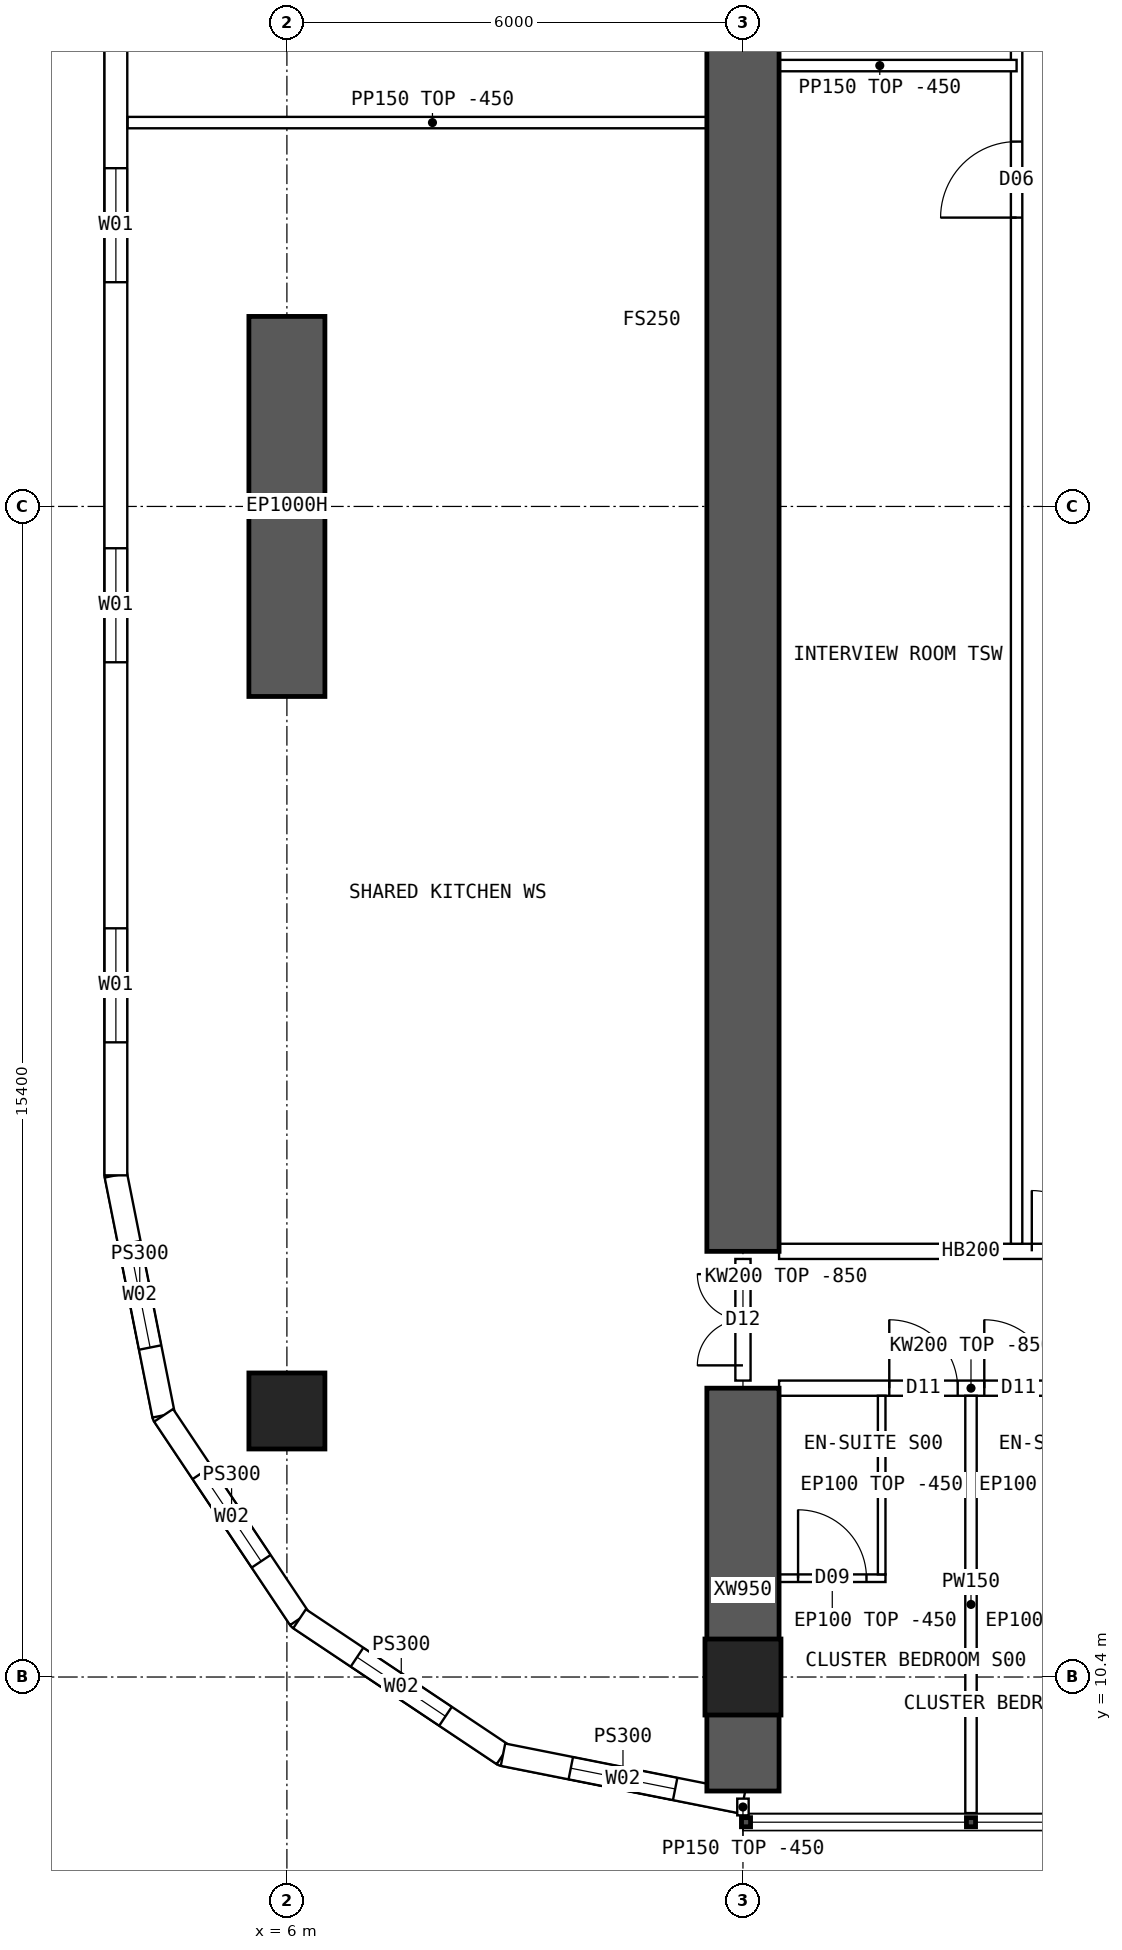
"""IFC4 building model, lengths in metres.
Left out: names, types, materials, properties, quantities, classifications, styles, units other than length and angle.
Written with IfcOpenShell. Run it as: python <this file> out.ifc"""

import sys

from ifc_helpers import new_model, si_unit, direction, frame, frame_2d, origin, origin_2d, place, context, subcontext, project, spatial, polyline, rectangle, hollow_rectangle, outline, extrude, element, fill, save


model = new_model("IFC4")
c1 = context("Model", 3, precision=1e-05, world=origin(), true_north=direction((0.0, 1.0)))
c2 = subcontext(c1, "Body", "Model", "MODEL_VIEW")
j1 = project(units=[si_unit("LENGTHUNIT", "METRE"), si_unit("PLANEANGLEUNIT", "RADIAN")], contexts=[c1])
p1 = place(None, origin())
s1 = spatial("IfcSite", under=j1, at=p1, CompositionType="ELEMENT")
p2 = place(p1, origin())
s2 = spatial("IfcBuilding", under=s1, at=p2, CompositionType="ELEMENT")
p3 = place(p2, frame((0.0, 0.0, 80.65)))
s3 = spatial("IfcBuildingStorey", under=s2, at=p3, CompositionType="ELEMENT", Elevation=80.65)
for number, where, z_axis, x_axis in (
    (1, (12.0, 10.4, 0.0), (0.0, 0.0, 1.0), (1.0, 0.0, 0.0)),
    (2, (6.0, 13.9, 0.0), (0.0, 0.0, 1.0), (1.0, 0.0, 0.0)),
):
    element("IfcColumn", number, at=place(p3, frame(where, z_axis=z_axis, x_axis=x_axis)), inside=s3, PredefinedType="COLUMN", context=c2, shape_type="SweptSolid", body=[
        extrude(hollow_rectangle(XDim=1.0, YDim=1.0, WallThickness=0.1, at=origin_2d()), origin(), (0.0, 0.0, 1.0), 3.75),
    ])
p4 = place(p3, frame((6.0, 23.3, 0.0), z_axis=(0.0, 0.0, 1.0), x_axis=(0.0, 1.0, 0.0)))
e3 = element("IfcWall", 3, at=p4, inside=s3, PredefinedType="SHEAR", context=c2, shape_type="SweptSolid", body=[
    extrude(rectangle(XDim=5.0, YDim=1.0, at=frame_2d((2.5, 0.0))), origin(), (0.0, 0.0, 1.0), 3.75),
])
p5 = place(p3, frame((12.0, 8.9, 0.0), z_axis=(0.0, 0.0, 1.0), x_axis=(0.0, 1.0, 0.0)))
e4 = element("IfcWall", 4, at=p5, inside=s3, PredefinedType="SHEAR", context=c2, shape_type="SweptSolid", body=[
    extrude(rectangle(XDim=5.3, YDim=0.95, at=frame_2d((2.65, 0.0))), origin(), (0.0, 0.0, 1.0), 3.75),
])
p6 = place(p3, frame((12.0, 16.0, 0.0), z_axis=(0.0, 0.0, 1.0), x_axis=(0.0, 1.0, 0.0)))
e5 = element("IfcWall", 5, at=p6, inside=s3, PredefinedType="SHEAR", context=c2, shape_type="SweptSolid", body=[
    extrude(rectangle(XDim=32.0, YDim=0.95, at=frame_2d((16.0, 0.0))), origin(), (0.0, 0.0, 1.0), 3.75),
])
p7 = place(p3, frame((3.75, 47.0, 0.0), z_axis=(0.0, 0.0, 1.0), x_axis=(0.0, -1.0, 0.0)))
e6 = element("IfcWall", 6, at=p7, inside=s3, PredefinedType="SOLIDWALL", context=c2, shape_type="SweptSolid", body=[
    extrude(outline(polyline([(-0.015, -0.15), (30.015, -0.15), (29.985, 0.15), (0.015, 0.15), (-0.015, -0.15)])), origin(), (0.0, 0.0, 1.0), 3.3),
])
p8 = place(p7, frame((1.75, 0.0, 0.9)))
e7 = element("IfcOpeningElement", 7, at=p8, cuts=e6, PredefinedType="OPENING", context=c2, shape_type="SweptSolid", body=[
    extrude(rectangle(XDim=1.5, YDim=2.0, at=frame_2d((0.75, 1.0))), frame((0.0, 0.16, 0.0), z_axis=(0.0, -1.0, 0.0), x_axis=(1.0, 0.0, 0.0)), (0.0, 0.0, 1.0), 0.32),
])
p9 = place(p7, frame((6.75, 0.0, 0.9)))
e8 = element("IfcOpeningElement", 8, at=p9, cuts=e6, PredefinedType="OPENING", context=c2, shape_type="SweptSolid", body=[
    extrude(rectangle(XDim=1.5, YDim=2.0, at=frame_2d((0.75, 1.0))), frame((0.0, 0.16, 0.0), z_axis=(0.0, -1.0, 0.0), x_axis=(1.0, 0.0, 0.0)), (0.0, 0.0, 1.0), 0.32),
])
p10 = place(p7, frame((11.75, 0.0, 0.9)))
e9 = element("IfcOpeningElement", 9, at=p10, cuts=e6, PredefinedType="OPENING", context=c2, shape_type="SweptSolid", body=[
    extrude(rectangle(XDim=1.5, YDim=2.0, at=frame_2d((0.75, 1.0))), frame((0.0, 0.16, 0.0), z_axis=(0.0, -1.0, 0.0), x_axis=(1.0, 0.0, 0.0)), (0.0, 0.0, 1.0), 0.32),
])
p11 = place(p7, frame((16.75, 0.0, 0.9)))
e10 = element("IfcOpeningElement", 10, at=p11, cuts=e6, PredefinedType="OPENING", context=c2, shape_type="SweptSolid", body=[
    extrude(rectangle(XDim=1.5, YDim=2.0, at=frame_2d((0.75, 1.0))), frame((0.0, 0.16, 0.0), z_axis=(0.0, -1.0, 0.0), x_axis=(1.0, 0.0, 0.0)), (0.0, 0.0, 1.0), 0.32),
])
p12 = place(p7, frame((21.75, 0.0, 0.9)))
e11 = element("IfcOpeningElement", 11, at=p12, cuts=e6, PredefinedType="OPENING", context=c2, shape_type="SweptSolid", body=[
    extrude(rectangle(XDim=1.5, YDim=2.0, at=frame_2d((0.75, 1.0))), frame((0.0, 0.16, 0.0), z_axis=(0.0, -1.0, 0.0), x_axis=(1.0, 0.0, 0.0)), (0.0, 0.0, 1.0), 0.32),
])
p13 = place(p7, frame((26.75, 0.0, 0.9)))
e12 = element("IfcOpeningElement", 12, at=p13, cuts=e6, PredefinedType="OPENING", context=c2, shape_type="SweptSolid", body=[
    extrude(rectangle(XDim=1.5, YDim=2.0, at=frame_2d((0.75, 1.0))), frame((0.0, 0.16, 0.0), z_axis=(0.0, -1.0, 0.0), x_axis=(1.0, 0.0, 0.0)), (0.0, 0.0, 1.0), 0.32),
])
p14 = place(p3, frame((3.75, 17.0, 0.0), z_axis=(0.0, 0.0, 1.0), x_axis=(0.195080412259, -0.980787251524, 0.0)))
e13 = element("IfcWall", 13, at=p14, inside=s3, PredefinedType="SOLIDWALL", context=c2, shape_type="SweptSolid", body=[
    extrude(outline(polyline([(-0.015, -0.15), (3.249, -0.15), (3.189, 0.15), (0.015, 0.15), (-0.015, -0.15)])), origin(), (0.0, 0.0, 1.0), 3.3),
])
p15 = place(p14, frame((0.909, 0.0, 0.9)))
e14 = element("IfcOpeningElement", 14, at=p15, cuts=e13, PredefinedType="OPENING", context=c2, shape_type="SweptSolid", body=[
    extrude(rectangle(XDim=1.4, YDim=1.8, at=frame_2d((0.7, 0.9))), frame((0.0, 0.16, 0.0), z_axis=(0.0, -1.0, 0.0), x_axis=(1.0, 0.0, 0.0)), (0.0, 0.0, 1.0), 0.32),
])
p16 = place(p3, frame((4.378, 13.843, 0.0), z_axis=(0.0, 0.0, 1.0), x_axis=(0.555609954424, -0.831443069936, 0.0)))
e15 = element("IfcWall", 15, at=p16, inside=s3, PredefinedType="SOLIDWALL", context=c2, shape_type="SweptSolid", body=[
    extrude(outline(polyline([(-0.03, -0.15), (3.249, -0.15), (3.189, 0.15), (0.03, 0.15), (-0.03, -0.15)])), origin(), (0.0, 0.0, 1.0), 3.3),
])
p17 = place(p16, frame((0.909, 0.0, 0.9)))
e16 = element("IfcOpeningElement", 16, at=p17, cuts=e15, PredefinedType="OPENING", context=c2, shape_type="SweptSolid", body=[
    extrude(rectangle(XDim=1.4, YDim=1.8, at=frame_2d((0.7, 0.9))), frame((0.0, 0.16, 0.0), z_axis=(0.0, -1.0, 0.0), x_axis=(1.0, 0.0, 0.0)), (0.0, 0.0, 1.0), 0.32),
])
p18 = place(p3, frame((6.167, 11.167, 0.0), z_axis=(0.0, 0.0, 1.0), x_axis=(0.831443069936, -0.555609954424, 0.0)))
e17 = element("IfcWall", 17, at=p18, inside=s3, PredefinedType="SOLIDWALL", context=c2, shape_type="SweptSolid", body=[
    extrude(outline(polyline([(-0.03, -0.15), (3.249, -0.15), (3.189, 0.15), (0.03, 0.15), (-0.03, -0.15)])), origin(), (0.0, 0.0, 1.0), 3.3),
])
p19 = place(p18, frame((0.909, 0.0, 0.9)))
e18 = element("IfcOpeningElement", 18, at=p19, cuts=e17, PredefinedType="OPENING", context=c2, shape_type="SweptSolid", body=[
    extrude(rectangle(XDim=1.4, YDim=1.8, at=frame_2d((0.7, 0.9))), frame((0.0, 0.16, 0.0), z_axis=(0.0, -1.0, 0.0), x_axis=(1.0, 0.0, 0.0)), (0.0, 0.0, 1.0), 0.32),
])
p20 = place(p3, frame((8.843, 9.378, 0.0), z_axis=(0.0, 0.0, 1.0), x_axis=(0.980787251524, -0.195080412259, 0.0)))
e19 = element("IfcWall", 19, at=p20, inside=s3, PredefinedType="SOLIDWALL", context=c2, shape_type="SweptSolid", body=[
    extrude(outline(polyline([(-0.03, -0.15), (3.249, -0.15), (3.189, 0.15), (0.03, 0.15), (-0.03, -0.15)])), origin(), (0.0, 0.0, 1.0), 3.3),
])
p21 = place(p20, frame((0.909, 0.0, 0.9)))
e20 = element("IfcOpeningElement", 20, at=p21, cuts=e19, PredefinedType="OPENING", context=c2, shape_type="SweptSolid", body=[
    extrude(rectangle(XDim=1.4, YDim=1.8, at=frame_2d((0.7, 0.9))), frame((0.0, 0.16, 0.0), z_axis=(0.0, -1.0, 0.0), x_axis=(1.0, 0.0, 0.0)), (0.0, 0.0, 1.0), 0.32),
])
p22 = place(p3, frame((12.475, 14.2, 0.0), z_axis=(0.0, 0.0, 1.0), x_axis=(1.0, 0.0, 0.0)))
e21 = element("IfcWall", 21, at=p22, inside=s3, PredefinedType="SOLIDWALL", context=c2, shape_type="SweptSolid", body=[
    extrude(outline(polyline([(0.0, 0.0), (5.05, 0.0), (5.05, 2.9), (0.0, 2.9), (0.0, 0.0)])), frame((0.0, 0.1, 0.0), z_axis=(0.0, -1.0, 0.0), x_axis=(1.0, 0.0, 0.0)), (0.0, 0.0, 1.0), 0.2),
])
p23 = place(p22, frame((1.45, 0.0, 0.0)))
e22 = element("IfcOpeningElement", 22, at=p23, cuts=e21, PredefinedType="OPENING", context=c2, shape_type="SweptSolid", body=[
    extrude(rectangle(XDim=0.9, YDim=2.1, at=frame_2d((0.45, 1.05))), frame((0.0, 0.11, 0.0), z_axis=(0.0, -1.0, 0.0), x_axis=(1.0, 0.0, 0.0)), (0.0, 0.0, 1.0), 0.22),
])
p24 = place(p22, frame((2.7, 0.0, 0.0)))
e23 = element("IfcOpeningElement", 23, at=p24, cuts=e21, PredefinedType="OPENING", context=c2, shape_type="SweptSolid", body=[
    extrude(rectangle(XDim=0.9, YDim=2.1, at=frame_2d((0.45, 1.05))), frame((0.0, 0.11, 0.0), z_axis=(0.0, -1.0, 0.0), x_axis=(1.0, 0.0, 0.0)), (0.0, 0.0, 1.0), 0.22),
])
p25 = place(p3, frame((12.475, 16.0, 0.0), z_axis=(0.0, 0.0, 1.0), x_axis=(1.0, 0.0, 0.0)))
e24 = element("IfcWall", 24, at=p25, inside=s3, PredefinedType="SOLIDWALL", context=c2, shape_type="SweptSolid", body=[
    extrude(rectangle(XDim=5.05, YDim=0.2, at=frame_2d((2.525, 0.0))), origin(), (0.0, 0.0, 1.0), 3.3),
])
p26 = place(p25, frame((3.325, 0.0, 0.0)))
e25 = element("IfcOpeningElement", 25, at=p26, cuts=e24, PredefinedType="OPENING", context=c2, shape_type="SweptSolid", body=[
    extrude(rectangle(XDim=1.6, YDim=2.1, at=frame_2d((0.8, 1.05))), frame((0.0, 0.11, 0.0), z_axis=(0.0, -1.0, 0.0), x_axis=(1.0, 0.0, 0.0)), (0.0, 0.0, 1.0), 0.22),
])
p27 = place(p3, frame((15.0, 8.61, 0.0), z_axis=(0.0, 0.0, 1.0), x_axis=(0.0, 1.0, 0.0)))
e26 = element("IfcWall", 26, at=p27, inside=s3, PredefinedType="PARTITIONING", context=c2, shape_type="SweptSolid", body=[
    extrude(outline(polyline([(0.0, 0.0), (5.49, 0.0), (5.49, 2.9), (5.442, 2.9), (5.44, 3.3), (1.992, 3.3), (1.99, 2.9), (1.592, 2.9), (1.59, 3.3), (0.0, 3.3), (0.0, 0.0)])), frame((0.0, 0.075, 0.0), z_axis=(0.0, -1.0, 0.0), x_axis=(1.0, 0.0, 0.0)), (0.0, 0.0, 1.0), 0.15),
])
p28 = place(p3, frame((13.875, 11.7, 0.0), z_axis=(0.0, 0.0, 1.0), x_axis=(-1.0, 0.0, 0.0)))
e27 = element("IfcWall", 27, at=p28, inside=s3, PredefinedType="PARTITIONING", context=c2, shape_type="SweptSolid", body=[
    extrude(rectangle(XDim=1.4, YDim=0.1, at=frame_2d((0.7, 0.0))), origin(), (0.0, 0.0, 1.0), 3.3),
])
p29 = place(p28, frame((0.25, 0.0, 0.0)))
e28 = element("IfcOpeningElement", 28, at=p29, cuts=e27, PredefinedType="OPENING", context=c2, shape_type="SweptSolid", body=[
    extrude(rectangle(XDim=0.9, YDim=2.1, at=frame_2d((0.45, 1.05))), frame((0.0, 0.06, 0.0), z_axis=(0.0, -1.0, 0.0), x_axis=(1.0, 0.0, 0.0)), (0.0, 0.0, 1.0), 0.12),
])
p30 = place(p3, frame((13.825, 11.75, 0.0), z_axis=(0.0, 0.0, 1.0), x_axis=(0.0, 1.0, 0.0)))
e29 = element("IfcWall", 29, at=p30, inside=s3, PredefinedType="PARTITIONING", context=c2, shape_type="SweptSolid", body=[
    extrude(outline(polyline([(0.0, 0.0), (2.35, 0.0), (2.35, 2.9), (2.302, 2.9), (2.3, 3.3), (0.0, 3.3), (0.0, 0.0)])), frame((0.0, 0.05, 0.0), z_axis=(0.0, -1.0, 0.0), x_axis=(1.0, 0.0, 0.0)), (0.0, 0.0, 1.0), 0.1),
])
p31 = place(p3, frame((15.6, 16.1, 0.0), z_axis=(0.0, 0.0, 1.0), x_axis=(0.0, 1.0, 0.0)))
e30 = element("IfcWall", 30, at=p31, inside=s3, PredefinedType="PARTITIONING", context=c2, shape_type="SweptSolid", body=[
    extrude(rectangle(XDim=31.8, YDim=0.15, at=frame_2d((15.9, 0.0))), origin(), (0.0, 0.0, 1.0), 3.3),
])
p32 = place(p31, frame((13.5, 0.0, 0.0)))
e31 = element("IfcOpeningElement", 31, at=p32, cuts=e30, PredefinedType="OPENING", context=c2, shape_type="SweptSolid", body=[
    extrude(rectangle(XDim=1.0, YDim=2.1, at=frame_2d((0.5, 1.05))), frame((0.0, 0.085, 0.0), z_axis=(0.0, -1.0, 0.0), x_axis=(1.0, 0.0, 0.0)), (0.0, 0.0, 1.0), 0.17),
])
p33 = place(p31, frame((16.5, 0.0, 0.0)))
e32 = element("IfcOpeningElement", 32, at=p33, cuts=e30, PredefinedType="OPENING", context=c2, shape_type="SweptSolid", body=[
    extrude(rectangle(XDim=1.0, YDim=2.1, at=frame_2d((0.5, 1.05))), frame((0.0, 0.085, 0.0), z_axis=(0.0, -1.0, 0.0), x_axis=(1.0, 0.0, 0.0)), (0.0, 0.0, 1.0), 0.17),
])
p34 = place(p3, frame((12.0, 31.6, 0.0), z_axis=(0.0, 0.0, 1.0), x_axis=(1.0, 0.0, 0.0)))
e33 = element("IfcWall", 33, at=p34, inside=s3, PredefinedType="PARTITIONING", context=c2, shape_type="SweptSolid", body=[
    extrude(rectangle(XDim=3.6, YDim=0.15, at=frame_2d((1.8, 0.0))), origin(), (0.0, 0.0, 1.0), 3.3),
])
p35 = place(p3, frame((3.905, 30.85, 0.0), z_axis=(0.0, 0.0, 1.0), x_axis=(1.0, 0.0, 0.0)))
e34 = element("IfcWall", 34, at=p35, inside=s3, PredefinedType="PARTITIONING", context=c2, shape_type="SweptSolid", body=[
    extrude(outline(polyline([(0.0, 0.0), (8.02, 0.0), (8.02, 3.3), (2.397, 3.3), (2.395, 2.85), (1.797, 2.85), (1.795, 3.3), (0.0, 3.3), (0.0, 0.0)])), frame((0.0, 0.075, 0.0), z_axis=(0.0, -1.0, 0.0), x_axis=(1.0, 0.0, 0.0)), (0.0, 0.0, 1.0), 0.15),
])
p36 = place(p3, frame((12.0, 14.3, 0.0), z_axis=(0.0, 0.0, 1.0), x_axis=(0.0, 1.0, 0.0)))
e35 = element("IfcWall", 35, at=p36, inside=s3, PredefinedType="SOLIDWALL", context=c2, shape_type="SweptSolid", body=[
    extrude(outline(polyline([(0.0, 0.0), (1.6, 0.0), (1.6, 2.9), (0.0, 2.9), (0.0, 0.0)])), frame((0.0, 0.1, 0.0), z_axis=(0.0, -1.0, 0.0), x_axis=(1.0, 0.0, 0.0)), (0.0, 0.0, 1.0), 0.2),
])
p37 = place(p36, frame((0.2, 0.0, 0.0)))
e36 = element("IfcOpeningElement", 36, at=p37, cuts=e35, PredefinedType="OPENING", context=c2, shape_type="SweptSolid", body=[
    extrude(rectangle(XDim=1.2, YDim=2.1, at=frame_2d((0.6, 1.05))), frame((0.0, 0.11, 0.0), z_axis=(0.0, -1.0, 0.0), x_axis=(1.0, 0.0, 0.0)), (0.0, 0.0, 1.0), 0.22),
])
p38 = place(p3, frame((12.0, 8.8, 0.0), z_axis=(0.0, 0.0, 1.0), x_axis=(0.0, -1.0, 0.0)))
e37 = element("IfcWall", 37, at=p38, inside=s3, PredefinedType="PARTITIONING", context=c2, shape_type="SweptSolid", body=[
    extrude(rectangle(XDim=0.22, YDim=0.15, at=frame_2d((0.11, 0.0))), origin(), (0.0, 0.0, 1.0), 3.3),
])
p39 = place(p11, origin())
e38 = element("IfcWindow", 38, at=p39, inside=s3, PartitioningType="SINGLE_PANEL", PredefinedType="WINDOW", context=c2, shape_type="SweptSolid", body=[
    extrude(rectangle(XDim=1.5, YDim=2.0, at=frame_2d((0.75, 1.0))), frame((0.0, 0.03, 0.0), z_axis=(0.0, -1.0, 0.0), x_axis=(1.0, 0.0, 0.0)), (0.0, 0.0, 1.0), 0.06),
])
fill(e10, e38)
p40 = place(p12, origin())
e39 = element("IfcWindow", 39, at=p40, inside=s3, PartitioningType="SINGLE_PANEL", PredefinedType="WINDOW", context=c2, shape_type="SweptSolid", body=[
    extrude(rectangle(XDim=1.5, YDim=2.0, at=frame_2d((0.75, 1.0))), frame((0.0, 0.03, 0.0), z_axis=(0.0, -1.0, 0.0), x_axis=(1.0, 0.0, 0.0)), (0.0, 0.0, 1.0), 0.06),
])
fill(e11, e39)
p41 = place(p13, origin())
e40 = element("IfcWindow", 40, at=p41, inside=s3, PartitioningType="SINGLE_PANEL", PredefinedType="WINDOW", context=c2, shape_type="SweptSolid", body=[
    extrude(rectangle(XDim=1.5, YDim=2.0, at=frame_2d((0.75, 1.0))), frame((0.0, 0.03, 0.0), z_axis=(0.0, -1.0, 0.0), x_axis=(1.0, 0.0, 0.0)), (0.0, 0.0, 1.0), 0.06),
])
fill(e12, e40)
p42 = place(p15, origin())
e41 = element("IfcWindow", 41, at=p42, inside=s3, PartitioningType="SINGLE_PANEL", PredefinedType="WINDOW", context=c2, shape_type="SweptSolid", body=[
    extrude(rectangle(XDim=1.4, YDim=1.8, at=frame_2d((0.7, 0.9))), frame((0.0, 0.03, 0.0), z_axis=(0.0, -1.0, 0.0), x_axis=(1.0, 0.0, 0.0)), (0.0, 0.0, 1.0), 0.06),
])
fill(e14, e41)
p43 = place(p17, origin())
e42 = element("IfcWindow", 42, at=p43, inside=s3, PartitioningType="SINGLE_PANEL", PredefinedType="WINDOW", context=c2, shape_type="SweptSolid", body=[
    extrude(rectangle(XDim=1.4, YDim=1.8, at=frame_2d((0.7, 0.9))), frame((0.0, 0.03, 0.0), z_axis=(0.0, -1.0, 0.0), x_axis=(1.0, 0.0, 0.0)), (0.0, 0.0, 1.0), 0.06),
])
fill(e16, e42)
p44 = place(p19, origin())
e43 = element("IfcWindow", 43, at=p44, inside=s3, PartitioningType="SINGLE_PANEL", PredefinedType="WINDOW", context=c2, shape_type="SweptSolid", body=[
    extrude(rectangle(XDim=1.4, YDim=1.8, at=frame_2d((0.7, 0.9))), frame((0.0, 0.03, 0.0), z_axis=(0.0, -1.0, 0.0), x_axis=(1.0, 0.0, 0.0)), (0.0, 0.0, 1.0), 0.06),
])
fill(e18, e43)
p45 = place(p21, origin())
e44 = element("IfcWindow", 44, at=p45, inside=s3, PartitioningType="SINGLE_PANEL", PredefinedType="WINDOW", context=c2, shape_type="SweptSolid", body=[
    extrude(rectangle(XDim=1.4, YDim=1.8, at=frame_2d((0.7, 0.9))), frame((0.0, 0.03, 0.0), z_axis=(0.0, -1.0, 0.0), x_axis=(1.0, 0.0, 0.0)), (0.0, 0.0, 1.0), 0.06),
])
fill(e20, e44)
p46 = place(p26, origin())
e45 = element("IfcDoor", 45, at=p46, inside=s3, OperationType="DOUBLE_DOOR_SINGLE_SWING", PredefinedType="DOOR", context=c2, shape_type="SweptSolid", body=[
    extrude(rectangle(XDim=1.6, YDim=2.1, at=frame_2d((0.8, 1.05))), frame((0.0, 0.025, 0.0), z_axis=(0.0, -1.0, 0.0), x_axis=(1.0, 0.0, 0.0)), (0.0, 0.0, 1.0), 0.05),
])
fill(e25, e45)
p47 = place(p29, origin())
e46 = element("IfcDoor", 46, at=p47, inside=s3, OperationType="SINGLE_SWING_RIGHT", PredefinedType="DOOR", context=c2, shape_type="SweptSolid", body=[
    extrude(rectangle(XDim=0.9, YDim=2.1, at=frame_2d((0.45, 1.05))), frame((0.0, 0.025, 0.0), z_axis=(0.0, -1.0, 0.0), x_axis=(1.0, 0.0, 0.0)), (0.0, 0.0, 1.0), 0.05),
])
fill(e28, e46)
p48 = place(p23, origin())
e47 = element("IfcDoor", 47, at=p48, inside=s3, OperationType="SINGLE_SWING_LEFT", PredefinedType="DOOR", context=c2, shape_type="SweptSolid", body=[
    extrude(rectangle(XDim=0.9, YDim=2.1, at=frame_2d((0.45, 1.05))), frame((0.0, 0.025, 0.0), z_axis=(0.0, -1.0, 0.0), x_axis=(1.0, 0.0, 0.0)), (0.0, 0.0, 1.0), 0.05),
])
fill(e22, e47)
p49 = place(p24, origin())
e48 = element("IfcDoor", 48, at=p49, inside=s3, OperationType="SINGLE_SWING_LEFT", PredefinedType="DOOR", context=c2, shape_type="SweptSolid", body=[
    extrude(rectangle(XDim=0.9, YDim=2.1, at=frame_2d((0.45, 1.05))), frame((0.0, 0.025, 0.0), z_axis=(0.0, -1.0, 0.0), x_axis=(1.0, 0.0, 0.0)), (0.0, 0.0, 1.0), 0.05),
])
fill(e23, e48)
p50 = place(p32, origin())
e49 = element("IfcDoor", 49, at=p50, inside=s3, OperationType="SINGLE_SWING_LEFT", PredefinedType="DOOR", context=c2, shape_type="SweptSolid", body=[
    extrude(rectangle(XDim=1.0, YDim=2.1, at=frame_2d((0.5, 1.05))), frame((0.0, 0.025, 0.0), z_axis=(0.0, -1.0, 0.0), x_axis=(1.0, 0.0, 0.0)), (0.0, 0.0, 1.0), 0.05),
])
fill(e31, e49)
p51 = place(p37, origin())
e50 = element("IfcDoor", 50, at=p51, inside=s3, OperationType="DOUBLE_DOOR_SINGLE_SWING", PredefinedType="DOOR", context=c2, shape_type="SweptSolid", body=[
    extrude(rectangle(XDim=1.2, YDim=2.1, at=frame_2d((0.6, 1.05))), frame((0.0, 0.025, 0.0), z_axis=(0.0, -1.0, 0.0), x_axis=(1.0, 0.0, 0.0)), (0.0, 0.0, 1.0), 0.05),
])
fill(e36, e50)
save(model, sys.argv[1])
